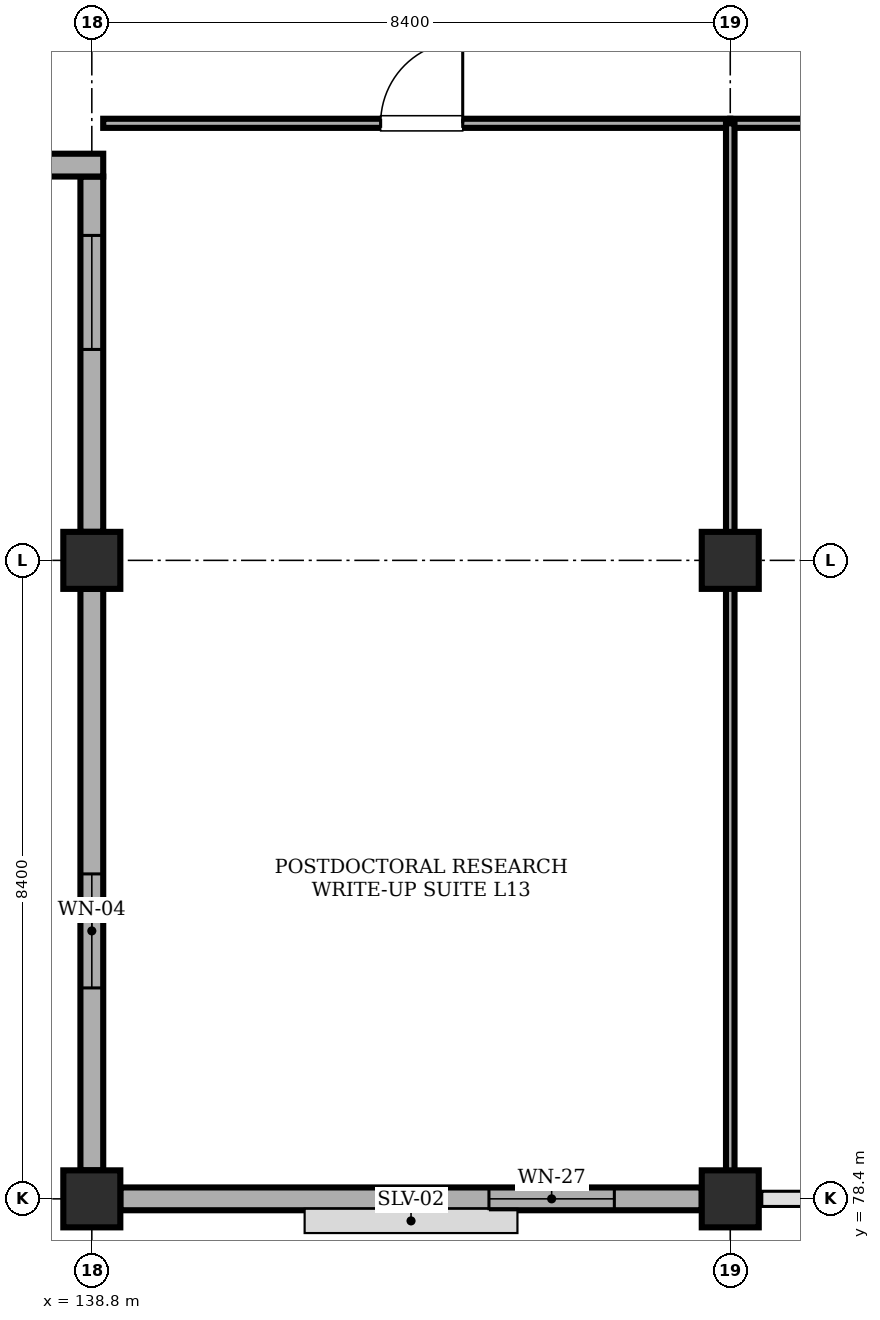
"""IFC4 building model, lengths in metres.
Left out: names, types, materials, properties, quantities, classifications, styles, units other than length and angle.
Written with IfcOpenShell. Run it as: python <this file> out.ifc"""

import sys

from ifc_helpers import new_model, si_unit, direction, frame, frame_2d, origin, origin_2d, place, context, subcontext, project, spatial, rectangle, extrude, element, fill, save


model = new_model("IFC4")
c1 = context("Model", 3, precision=1e-05, world=origin(), true_north=direction((0.0, 1.0)))
c2 = subcontext(c1, "Body", "Model", "MODEL_VIEW")
j1 = project(units=[si_unit("LENGTHUNIT", "METRE"), si_unit("PLANEANGLEUNIT", "RADIAN")], contexts=[c1])
p1 = place(None, origin())
s1 = spatial("IfcSite", under=j1, at=p1, CompositionType="ELEMENT")
p2 = place(p1, origin())
s2 = spatial("IfcBuilding", under=s1, at=p2, CompositionType="ELEMENT")
p3 = place(p2, frame((0.0, 0.0, 52.8)))
s3 = spatial("IfcBuildingStorey", under=s2, at=p3, CompositionType="ELEMENT", Elevation=52.8)
for number, where, z_axis, x_axis in (
    (1, (138.8, 78.4, 0.0), (0.0, 0.0, 1.0), (1.0, 0.0, 0.0)),
    (2, (138.8, 86.8, 0.0), (0.0, 0.0, 1.0), (1.0, 0.0, 0.0)),
    (3, (147.2, 78.4, 0.0), (0.0, 0.0, 1.0), (1.0, 0.0, 0.0)),
    (4, (147.2, 86.8, 0.0), (0.0, 0.0, 1.0), (1.0, 0.0, 0.0)),
):
    element("IfcColumn", number, at=place(p3, frame(where, z_axis=z_axis, x_axis=x_axis)), inside=s3, PredefinedType="COLUMN", context=c2, shape_type="SweptSolid", body=[
        extrude(rectangle(XDim=0.75, YDim=0.75, at=origin_2d()), origin(), (0.0, 0.0, 1.0), 4.03),
    ])
p4 = place(p3, frame((146.825, 78.4, 0.0), z_axis=(0.0, 0.0, 1.0), x_axis=(-1.0, 0.0, 0.0)))
e5 = element("IfcWall", 5, at=p4, inside=s3, PredefinedType="STANDARD", context=c2, shape_type="SweptSolid", body=[
    extrude(rectangle(XDim=7.65, YDim=0.3, at=frame_2d((3.825, 0.0))), origin(), (0.0, 0.0, 1.0), 3.33),
])
p5 = place(p4, frame((1.15, 0.0, 0.95)))
e6 = element("IfcOpeningElement", 6, at=p5, cuts=e5, PredefinedType="OPENING", context=c2, shape_type="SweptSolid", body=[
    extrude(rectangle(XDim=1.65, YDim=1.85, at=frame_2d((0.825, 0.925))), frame((0.0, 0.16, 0.0), z_axis=(0.0, -1.0, 0.0), x_axis=(1.0, 0.0, 0.0)), (0.0, 0.0, 1.0), 0.32),
])
p6 = place(p3, frame((138.8, 78.775, 0.0), z_axis=(0.0, 0.0, 1.0), x_axis=(0.0, 1.0, 0.0)))
e7 = element("IfcWall", 7, at=p6, inside=s3, PredefinedType="STANDARD", context=c2, shape_type="SweptSolid", body=[
    extrude(rectangle(XDim=7.65, YDim=0.3, at=frame_2d((3.825, 0.0))), origin(), (0.0, 0.0, 1.0), 3.33),
])
p7 = place(p6, frame((2.4, 0.0, 0.95)))
e8 = element("IfcOpeningElement", 8, at=p7, cuts=e7, PredefinedType="OPENING", context=c2, shape_type="SweptSolid", body=[
    extrude(rectangle(XDim=1.5, YDim=1.8, at=frame_2d((0.75, 0.9))), frame((0.0, 0.16, 0.0), z_axis=(0.0, -1.0, 0.0), x_axis=(1.0, 0.0, 0.0)), (0.0, 0.0, 1.0), 0.32),
])
p8 = place(p3, frame((138.8, 87.175, 0.0), z_axis=(0.0, 0.0, 1.0), x_axis=(0.0, 1.0, 0.0)))
e9 = element("IfcWall", 9, at=p8, inside=s3, PredefinedType="STANDARD", context=c2, shape_type="SweptSolid", body=[
    extrude(rectangle(XDim=4.675, YDim=0.3, at=frame_2d((2.337, 0.0))), origin(), (0.0, 0.0, 1.0), 3.33),
])
p9 = place(p8, frame((2.4, 0.0, 0.95)))
e10 = element("IfcOpeningElement", 10, at=p9, cuts=e9, PredefinedType="OPENING", context=c2, shape_type="SweptSolid", body=[
    extrude(rectangle(XDim=1.5, YDim=1.8, at=frame_2d((0.75, 0.9))), frame((0.0, 0.16, 0.0), z_axis=(0.0, -1.0, 0.0), x_axis=(1.0, 0.0, 0.0)), (0.0, 0.0, 1.0), 0.32),
])
p10 = place(p3, frame((138.95, 92.0, 0.0), z_axis=(0.0, 0.0, 1.0), x_axis=(-1.0, 0.0, 0.0)))
e11 = element("IfcWall", 11, at=p10, inside=s3, PredefinedType="STANDARD", context=c2, shape_type="SweptSolid", body=[
    extrude(rectangle(XDim=8.7, YDim=0.3, at=frame_2d((4.35, 0.0))), origin(), (0.0, 0.0, 1.0), 4.03),
])
p11 = place(p3, frame((138.95, 92.55, 0.0), z_axis=(0.0, 0.0, 1.0), x_axis=(1.0, 0.0, 0.0)))
e12 = element("IfcWall", 12, at=p11, inside=s3, PredefinedType="PARTITIONING", context=c2, shape_type="SweptSolid", body=[
    extrude(rectangle(XDim=8.25, YDim=0.12, at=frame_2d((4.125, 0.0))), origin(), (0.0, 0.0, 1.0), 4.03),
])
p12 = place(p11, frame((3.65, 0.0, 0.0)))
e13 = element("IfcOpeningElement", 13, at=p12, cuts=e12, PredefinedType="OPENING", context=c2, shape_type="SweptSolid", body=[
    extrude(rectangle(XDim=1.08, YDim=2.15, at=frame_2d((0.54, 1.075))), frame((0.0, 0.07, 0.0), z_axis=(0.0, -1.0, 0.0), x_axis=(1.0, 0.0, 0.0)), (0.0, 0.0, 1.0), 0.14),
])
p13 = place(p3, frame((147.2, 92.55, 0.0), z_axis=(0.0, 0.0, 1.0), x_axis=(1.0, 0.0, 0.0)))
e14 = element("IfcWall", 14, at=p13, inside=s3, PredefinedType="PARTITIONING", context=c2, shape_type="SweptSolid", body=[
    extrude(rectangle(XDim=8.4, YDim=0.12, at=frame_2d((4.2, 0.0))), origin(), (0.0, 0.0, 1.0), 4.03),
])
p14 = place(p13, frame((3.4, 0.0, 0.0)))
e15 = element("IfcOpeningElement", 15, at=p14, cuts=e14, PredefinedType="OPENING", context=c2, shape_type="SweptSolid", body=[
    extrude(rectangle(XDim=1.08, YDim=2.15, at=frame_2d((0.54, 1.075))), frame((0.0, 0.07, 0.0), z_axis=(0.0, -1.0, 0.0), x_axis=(1.0, 0.0, 0.0)), (0.0, 0.0, 1.0), 0.14),
])
p15 = place(p3, frame((147.2, 78.55, 0.0), z_axis=(0.0, 0.0, 1.0), x_axis=(0.0, 1.0, 0.0)))
e16 = element("IfcWall", 16, at=p15, inside=s3, PredefinedType="PARTITIONING", context=c2, shape_type="SweptSolid", body=[
    extrude(rectangle(XDim=14.0, YDim=0.112, at=frame_2d((7.0, 0.0))), origin(), (0.0, 0.0, 1.0), 3.33),
])
p16 = place(p5, origin())
e17 = element("IfcWindow", 17, at=p16, inside=s3, PartitioningType="DOUBLE_PANEL_VERTICAL", PredefinedType="WINDOW", context=c2, shape_type="SweptSolid", body=[
    extrude(rectangle(XDim=1.65, YDim=1.85, at=frame_2d((0.825, 0.925))), frame((0.0, 0.03, 0.0), z_axis=(0.0, -1.0, 0.0), x_axis=(1.0, 0.0, 0.0)), (0.0, 0.0, 1.0), 0.06),
])
fill(e6, e17)
p17 = place(p7, origin())
e18 = element("IfcWindow", 18, at=p17, inside=s3, PartitioningType="DOUBLE_PANEL_VERTICAL", PredefinedType="WINDOW", context=c2, shape_type="SweptSolid", body=[
    extrude(rectangle(XDim=1.5, YDim=1.8, at=frame_2d((0.75, 0.9))), frame((0.0, 0.03, 0.0), z_axis=(0.0, -1.0, 0.0), x_axis=(1.0, 0.0, 0.0)), (0.0, 0.0, 1.0), 0.06),
])
fill(e8, e18)
p18 = place(p9, origin())
e19 = element("IfcWindow", 19, at=p18, inside=s3, PartitioningType="DOUBLE_PANEL_VERTICAL", PredefinedType="WINDOW", context=c2, shape_type="SweptSolid", body=[
    extrude(rectangle(XDim=1.5, YDim=1.8, at=frame_2d((0.75, 0.9))), frame((0.0, 0.03, 0.0), z_axis=(0.0, -1.0, 0.0), x_axis=(1.0, 0.0, 0.0)), (0.0, 0.0, 1.0), 0.06),
])
fill(e10, e19)
p19 = place(p12, origin())
e20 = element("IfcDoor", 20, at=p19, inside=s3, OperationType="SINGLE_SWING_RIGHT", PredefinedType="DOOR", context=c2, shape_type="SweptSolid", body=[
    extrude(rectangle(XDim=1.08, YDim=2.15, at=frame_2d((0.54, 1.075))), frame((0.0, 0.025, 0.0), z_axis=(0.0, -1.0, 0.0), x_axis=(1.0, 0.0, 0.0)), (0.0, 0.0, 1.0), 0.05),
])
fill(e13, e20)
save(model, sys.argv[1])
